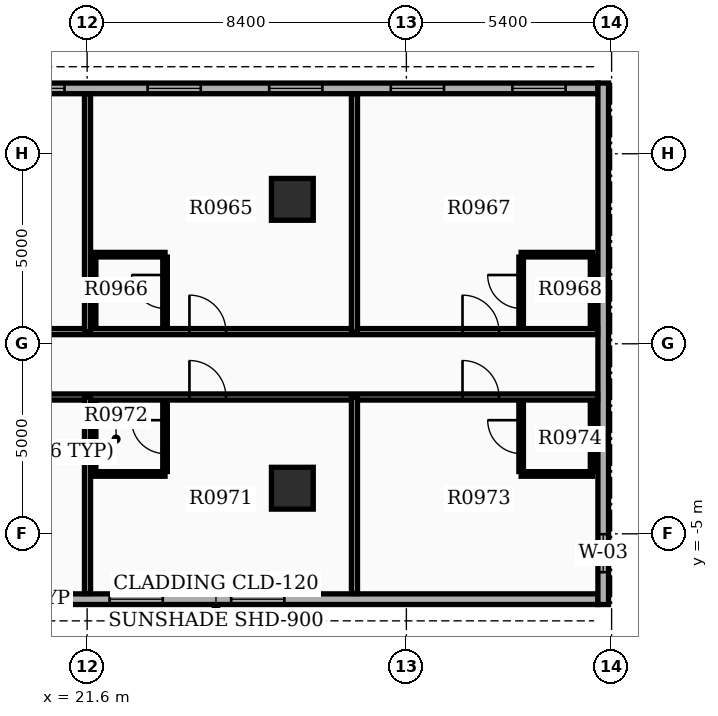
"""IFC4 building model, lengths in metres.
Left out: names, types, materials, properties, quantities, classifications, styles, units other than length and angle.
Written with IfcOpenShell. Run it as: python <this file> out.ifc"""

import sys

from ifc_helpers import new_model, si_unit, direction, frame, frame_2d, origin, origin_2d, place, context, subcontext, project, spatial, rectangle, extrude, element, fill, save


model = new_model("IFC4")
c1 = context("Model", 3, precision=1e-05, world=origin(), true_north=direction((0.0, 1.0)))
c2 = subcontext(c1, "Body", "Model", "MODEL_VIEW")
j1 = project(units=[si_unit("LENGTHUNIT", "METRE"), si_unit("PLANEANGLEUNIT", "RADIAN")], contexts=[c1])
p1 = place(None, origin())
s1 = spatial("IfcSite", under=j1, at=p1, CompositionType="ELEMENT")
p2 = place(p1, origin())
s2 = spatial("IfcBuilding", under=s1, at=p2, CompositionType="ELEMENT")
p3 = place(p2, frame((0.0, 0.0, 63.9)))
s3 = spatial("IfcBuildingStorey", under=s2, at=p3, CompositionType="ELEMENT", Elevation=63.9)
for number, where, z_axis, x_axis in (
    (1, (27.0, -3.8, 0.0), (0.0, 0.0, 1.0), (1.0, 0.0, 0.0)),
    (2, (27.0, 3.8, 0.0), (0.0, 0.0, 1.0), (1.0, 0.0, 0.0)),
):
    element("IfcColumn", number, at=place(p3, frame(where, z_axis=z_axis, x_axis=x_axis)), inside=s3, PredefinedType="COLUMN", context=c2, shape_type="SweptSolid", body=[
        extrude(rectangle(XDim=1.1, YDim=1.1, at=origin_2d()), origin(), (0.0, 0.0, 1.0), 3.9),
    ])
p4 = place(p3, frame((14.94, -6.72, 0.0), z_axis=(0.0, 0.0, 1.0), x_axis=(1.0, 0.0, 0.0)))
e3 = element("IfcWall", 3, at=p4, inside=s3, PredefinedType="STANDARD", context=c2, shape_type="SweptSolid", body=[
    extrude(rectangle(XDim=20.1, YDim=0.28, at=frame_2d((10.05, 0.0))), origin(), (0.0, 0.0, 1.0), 2.91),
])
p5 = place(p4, frame((4.05, 0.0, 0.8)))
e4 = element("IfcOpeningElement", 4, at=p5, cuts=e3, PredefinedType="OPENING", context=c2, shape_type="SweptSolid", body=[
    extrude(rectangle(XDim=1.4, YDim=1.6, at=frame_2d((0.7, 0.8))), frame((0.0, 0.15, 0.0), z_axis=(0.0, -1.0, 0.0), x_axis=(1.0, 0.0, 0.0)), (0.0, 0.0, 1.0), 0.3),
])
p6 = place(p4, frame((7.25, 0.0, 0.8)))
e5 = element("IfcOpeningElement", 5, at=p6, cuts=e3, PredefinedType="OPENING", context=c2, shape_type="SweptSolid", body=[
    extrude(rectangle(XDim=1.4, YDim=1.6, at=frame_2d((0.7, 0.8))), frame((0.0, 0.15, 0.0), z_axis=(0.0, -1.0, 0.0), x_axis=(1.0, 0.0, 0.0)), (0.0, 0.0, 1.0), 0.3),
])
p7 = place(p4, frame((10.45, 0.0, 0.8)))
e6 = element("IfcOpeningElement", 6, at=p7, cuts=e3, PredefinedType="OPENING", context=c2, shape_type="SweptSolid", body=[
    extrude(rectangle(XDim=1.4, YDim=1.6, at=frame_2d((0.7, 0.8))), frame((0.0, 0.15, 0.0), z_axis=(0.0, -1.0, 0.0), x_axis=(1.0, 0.0, 0.0)), (0.0, 0.0, 1.0), 0.3),
])
p8 = place(p4, frame((0.3, 0.0, 0.0)))
e7 = element("IfcOpeningElement", 7, at=p8, cuts=e3, PredefinedType="OPENING", context=c2, shape_type="SweptSolid", body=[
    extrude(rectangle(XDim=0.96, YDim=2.1, at=frame_2d((0.48, 1.05))), frame((0.0, 0.15, 0.0), z_axis=(0.0, -1.0, 0.0), x_axis=(1.0, 0.0, 0.0)), (0.0, 0.0, 1.0), 0.3),
])
p9 = place(p3, frame((35.04, 6.72, 0.0), z_axis=(0.0, 0.0, 1.0), x_axis=(-1.0, 0.0, 0.0)))
e8 = element("IfcWall", 8, at=p9, inside=s3, PredefinedType="STANDARD", context=c2, shape_type="SweptSolid", body=[
    extrude(rectangle(XDim=20.1, YDim=0.28, at=frame_2d((10.05, 0.0))), origin(), (0.0, 0.0, 1.0), 2.91),
])
p10 = place(p9, frame((0.85, 0.0, 0.8)))
e9 = element("IfcOpeningElement", 9, at=p10, cuts=e8, PredefinedType="OPENING", context=c2, shape_type="SweptSolid", body=[
    extrude(rectangle(XDim=1.4, YDim=1.6, at=frame_2d((0.7, 0.8))), frame((0.0, 0.15, 0.0), z_axis=(0.0, -1.0, 0.0), x_axis=(1.0, 0.0, 0.0)), (0.0, 0.0, 1.0), 0.3),
])
p11 = place(p9, frame((4.05, 0.0, 0.8)))
e10 = element("IfcOpeningElement", 10, at=p11, cuts=e8, PredefinedType="OPENING", context=c2, shape_type="SweptSolid", body=[
    extrude(rectangle(XDim=1.4, YDim=1.6, at=frame_2d((0.7, 0.8))), frame((0.0, 0.15, 0.0), z_axis=(0.0, -1.0, 0.0), x_axis=(1.0, 0.0, 0.0)), (0.0, 0.0, 1.0), 0.3),
])
p12 = place(p9, frame((7.25, 0.0, 0.8)))
e11 = element("IfcOpeningElement", 11, at=p12, cuts=e8, PredefinedType="OPENING", context=c2, shape_type="SweptSolid", body=[
    extrude(rectangle(XDim=1.4, YDim=1.6, at=frame_2d((0.7, 0.8))), frame((0.0, 0.15, 0.0), z_axis=(0.0, -1.0, 0.0), x_axis=(1.0, 0.0, 0.0)), (0.0, 0.0, 1.0), 0.3),
])
p13 = place(p9, frame((10.45, 0.0, 0.8)))
e12 = element("IfcOpeningElement", 12, at=p13, cuts=e8, PredefinedType="OPENING", context=c2, shape_type="SweptSolid", body=[
    extrude(rectangle(XDim=1.4, YDim=1.6, at=frame_2d((0.7, 0.8))), frame((0.0, 0.15, 0.0), z_axis=(0.0, -1.0, 0.0), x_axis=(1.0, 0.0, 0.0)), (0.0, 0.0, 1.0), 0.3),
])
p14 = place(p9, frame((14.035, 0.0, 0.85)))
e13 = element("IfcOpeningElement", 13, at=p14, cuts=e8, PredefinedType="OPENING", context=c2, shape_type="SweptSolid", body=[
    extrude(rectangle(XDim=1.2, YDim=1.6, at=frame_2d((0.6, 0.8))), frame((0.0, 0.15, 0.0), z_axis=(0.0, -1.0, 0.0), x_axis=(1.0, 0.0, 0.0)), (0.0, 0.0, 1.0), 0.3),
])
p15 = place(p3, frame((35.18, -6.86, 0.0), z_axis=(0.0, 0.0, 1.0), x_axis=(0.0, 1.0, 0.0)))
e14 = element("IfcWall", 14, at=p15, inside=s3, PredefinedType="STANDARD", context=c2, shape_type="SweptSolid", body=[
    extrude(rectangle(XDim=13.72, YDim=0.28, at=frame_2d((6.86, 0.0))), origin(), (0.0, 0.0, 1.0), 2.91),
])
p16 = place(p15, frame((0.85, 0.0, 0.85)))
e15 = element("IfcOpeningElement", 15, at=p16, cuts=e14, PredefinedType="OPENING", context=c2, shape_type="SweptSolid", body=[
    extrude(rectangle(XDim=1.0, YDim=1.5, at=frame_2d((0.5, 0.75))), frame((0.0, 0.15, 0.0), z_axis=(0.0, -1.0, 0.0), x_axis=(1.0, 0.0, 0.0)), (0.0, 0.0, 1.0), 0.3),
])
p17 = place(p3, frame((14.85, 0.32, 0.0), z_axis=(0.0, 0.0, 1.0), x_axis=(1.0, 0.0, 0.0)))
e16 = element("IfcWall", 16, at=p17, inside=s3, PredefinedType="PARTITIONING", context=c2, shape_type="SweptSolid", body=[
    extrude(rectangle(XDim=20.182, YDim=0.16, at=frame_2d((10.091, 0.0))), origin(), (0.0, 0.0, 1.0), 2.9),
])
p18 = place(p17, frame((2.656, 0.0, 0.0)))
e17 = element("IfcOpeningElement", 17, at=p18, cuts=e16, PredefinedType="OPENING", context=c2, shape_type="SweptSolid", body=[
    extrude(rectangle(XDim=0.96, YDim=2.15, at=frame_2d((0.48, 1.075))), frame((0.0, 0.09, 0.0), z_axis=(0.0, -1.0, 0.0), x_axis=(1.0, 0.0, 0.0)), (0.0, 0.0, 1.0), 0.18),
])
p19 = place(p17, frame((9.442, 0.0, 0.0)))
e18 = element("IfcOpeningElement", 18, at=p19, cuts=e16, PredefinedType="OPENING", context=c2, shape_type="SweptSolid", body=[
    extrude(rectangle(XDim=0.96, YDim=2.15, at=frame_2d((0.48, 1.075))), frame((0.0, 0.09, 0.0), z_axis=(0.0, -1.0, 0.0), x_axis=(1.0, 0.0, 0.0)), (0.0, 0.0, 1.0), 0.18),
])
p20 = place(p17, frame((16.627, 0.0, 0.0)))
e19 = element("IfcOpeningElement", 19, at=p20, cuts=e16, PredefinedType="OPENING", context=c2, shape_type="SweptSolid", body=[
    extrude(rectangle(XDim=0.96, YDim=2.15, at=frame_2d((0.48, 1.075))), frame((0.0, 0.09, 0.0), z_axis=(0.0, -1.0, 0.0), x_axis=(1.0, 0.0, 0.0)), (0.0, 0.0, 1.0), 0.18),
])
for number, where, z_axis, x_axis in (
    (20, (21.61, 0.32, 0.0), (0.0, 0.0, 1.0), (0.0, 1.0, 0.0)),
    (21, (28.634, 0.32, 0.0), (0.0, 0.0, 1.0), (0.0, 1.0, 0.0)),
):
    element("IfcWall", number, at=place(p3, frame(where, z_axis=z_axis, x_axis=x_axis)), inside=s3, PredefinedType="PARTITIONING", context=c2, shape_type="SweptSolid", body=[
        extrude(rectangle(XDim=6.252, YDim=0.16, at=frame_2d((3.126, 0.0))), origin(), (0.0, 0.0, 1.0), 2.9),
    ])
p21 = place(p3, frame((23.65, 0.46, 0.0), z_axis=(0.0, 0.0, 1.0), x_axis=(0.0, 1.0, 0.0)))
e22 = element("IfcWall", 22, at=p21, inside=s3, PredefinedType="PARTITIONING", context=c2, shape_type="SweptSolid", body=[
    extrude(rectangle(XDim=1.82, YDim=0.12, at=frame_2d((0.91, 0.0))), origin(), (0.0, 0.0, 1.0), 2.9),
])
p22 = place(p21, frame((0.47, 0.0, 0.0)))
e23 = element("IfcOpeningElement", 23, at=p22, cuts=e22, PredefinedType="OPENING", context=c2, shape_type="SweptSolid", body=[
    extrude(rectangle(XDim=0.88, YDim=2.1, at=frame_2d((0.44, 1.05))), frame((0.0, 0.07, 0.0), z_axis=(0.0, -1.0, 0.0), x_axis=(1.0, 0.0, 0.0)), (0.0, 0.0, 1.0), 0.14),
])
p23 = place(p3, frame((21.77, 0.46, 0.0), z_axis=(0.0, 0.0, 1.0), x_axis=(0.0, 1.0, 0.0)))
e24 = element("IfcWall", 24, at=p23, inside=s3, PredefinedType="PARTITIONING", context=c2, shape_type="SweptSolid", body=[
    extrude(rectangle(XDim=1.82, YDim=0.12, at=frame_2d((0.91, 0.0))), origin(), (0.0, 0.0, 1.0), 2.9),
])
p24 = place(p3, frame((21.77, 2.345, 0.0), z_axis=(0.0, 0.0, 1.0), x_axis=(1.0, 0.0, 0.0)))
e25 = element("IfcWall", 25, at=p24, inside=s3, PredefinedType="PARTITIONING", context=c2, shape_type="SweptSolid", body=[
    extrude(rectangle(XDim=1.88, YDim=0.12, at=frame_2d((0.94, 0.0))), origin(), (0.0, 0.0, 1.0), 2.9),
])
p25 = place(p3, frame((33.02, 0.46, 0.0), z_axis=(0.0, 0.0, 1.0), x_axis=(0.0, 1.0, 0.0)))
e26 = element("IfcWall", 26, at=p25, inside=s3, PredefinedType="PARTITIONING", context=c2, shape_type="SweptSolid", body=[
    extrude(rectangle(XDim=1.82, YDim=0.12, at=frame_2d((0.91, 0.0))), origin(), (0.0, 0.0, 1.0), 2.9),
])
p26 = place(p25, frame((0.47, 0.0, 0.0)))
e27 = element("IfcOpeningElement", 27, at=p26, cuts=e26, PredefinedType="OPENING", context=c2, shape_type="SweptSolid", body=[
    extrude(rectangle(XDim=0.88, YDim=2.1, at=frame_2d((0.44, 1.05))), frame((0.0, 0.07, 0.0), z_axis=(0.0, -1.0, 0.0), x_axis=(1.0, 0.0, 0.0)), (0.0, 0.0, 1.0), 0.14),
])
p27 = place(p3, frame((34.9, 0.46, 0.0), z_axis=(0.0, 0.0, 1.0), x_axis=(0.0, 1.0, 0.0)))
e28 = element("IfcWall", 28, at=p27, inside=s3, PredefinedType="PARTITIONING", context=c2, shape_type="SweptSolid", body=[
    extrude(rectangle(XDim=1.82, YDim=0.12, at=frame_2d((0.91, 0.0))), origin(), (0.0, 0.0, 1.0), 2.9),
])
p28 = place(p3, frame((33.02, 2.345, 0.0), z_axis=(0.0, 0.0, 1.0), x_axis=(1.0, 0.0, 0.0)))
e29 = element("IfcWall", 29, at=p28, inside=s3, PredefinedType="PARTITIONING", context=c2, shape_type="SweptSolid", body=[
    extrude(rectangle(XDim=1.88, YDim=0.12, at=frame_2d((0.94, 0.0))), origin(), (0.0, 0.0, 1.0), 2.9),
])
p29 = place(p3, frame((14.85, -1.4, 0.0), z_axis=(0.0, 0.0, 1.0), x_axis=(1.0, 0.0, 0.0)))
e30 = element("IfcWall", 30, at=p29, inside=s3, PredefinedType="PARTITIONING", context=c2, shape_type="SweptSolid", body=[
    extrude(rectangle(XDim=20.182, YDim=0.16, at=frame_2d((10.091, 0.0))), origin(), (0.0, 0.0, 1.0), 2.9),
])
p30 = place(p29, frame((2.656, 0.0, 0.0)))
e31 = element("IfcOpeningElement", 31, at=p30, cuts=e30, PredefinedType="OPENING", context=c2, shape_type="SweptSolid", body=[
    extrude(rectangle(XDim=0.96, YDim=2.15, at=frame_2d((0.48, 1.075))), frame((0.0, 0.09, 0.0), z_axis=(0.0, -1.0, 0.0), x_axis=(1.0, 0.0, 0.0)), (0.0, 0.0, 1.0), 0.18),
])
p31 = place(p29, frame((9.442, 0.0, 0.0)))
e32 = element("IfcOpeningElement", 32, at=p31, cuts=e30, PredefinedType="OPENING", context=c2, shape_type="SweptSolid", body=[
    extrude(rectangle(XDim=0.96, YDim=2.15, at=frame_2d((0.48, 1.075))), frame((0.0, 0.09, 0.0), z_axis=(0.0, -1.0, 0.0), x_axis=(1.0, 0.0, 0.0)), (0.0, 0.0, 1.0), 0.18),
])
p32 = place(p29, frame((16.627, 0.0, 0.0)))
e33 = element("IfcOpeningElement", 33, at=p32, cuts=e30, PredefinedType="OPENING", context=c2, shape_type="SweptSolid", body=[
    extrude(rectangle(XDim=0.96, YDim=2.15, at=frame_2d((0.48, 1.075))), frame((0.0, 0.09, 0.0), z_axis=(0.0, -1.0, 0.0), x_axis=(1.0, 0.0, 0.0)), (0.0, 0.0, 1.0), 0.18),
])
for number, where, z_axis, x_axis in (
    (34, (21.61, -1.4, 0.0), (0.0, 0.0, 1.0), (0.0, -1.0, 0.0)),
    (35, (28.634, -1.4, 0.0), (0.0, 0.0, 1.0), (0.0, -1.0, 0.0)),
):
    element("IfcWall", number, at=place(p3, frame(where, z_axis=z_axis, x_axis=x_axis)), inside=s3, PredefinedType="PARTITIONING", context=c2, shape_type="SweptSolid", body=[
        extrude(rectangle(XDim=5.172, YDim=0.16, at=frame_2d((2.586, 0.0))), origin(), (0.0, 0.0, 1.0), 2.9),
    ])
p33 = place(p3, frame((23.65, -3.36, 0.0), z_axis=(0.0, 0.0, 1.0), x_axis=(0.0, 1.0, 0.0)))
e36 = element("IfcWall", 36, at=p33, inside=s3, PredefinedType="PARTITIONING", context=c2, shape_type="SweptSolid", body=[
    extrude(rectangle(XDim=1.82, YDim=0.12, at=frame_2d((0.91, 0.0))), origin(), (0.0, 0.0, 1.0), 2.9),
])
p34 = place(p33, frame((0.47, 0.0, 0.0)))
e37 = element("IfcOpeningElement", 37, at=p34, cuts=e36, PredefinedType="OPENING", context=c2, shape_type="SweptSolid", body=[
    extrude(rectangle(XDim=0.88, YDim=2.1, at=frame_2d((0.44, 1.05))), frame((0.0, 0.07, 0.0), z_axis=(0.0, -1.0, 0.0), x_axis=(1.0, 0.0, 0.0)), (0.0, 0.0, 1.0), 0.14),
])
p35 = place(p3, frame((21.77, -3.36, 0.0), z_axis=(0.0, 0.0, 1.0), x_axis=(0.0, 1.0, 0.0)))
e38 = element("IfcWall", 38, at=p35, inside=s3, PredefinedType="PARTITIONING", context=c2, shape_type="SweptSolid", body=[
    extrude(rectangle(XDim=1.82, YDim=0.12, at=frame_2d((0.91, 0.0))), origin(), (0.0, 0.0, 1.0), 2.9),
])
p36 = place(p3, frame((21.77, -3.425, 0.0), z_axis=(0.0, 0.0, 1.0), x_axis=(1.0, 0.0, 0.0)))
e39 = element("IfcWall", 39, at=p36, inside=s3, PredefinedType="PARTITIONING", context=c2, shape_type="SweptSolid", body=[
    extrude(rectangle(XDim=1.88, YDim=0.12, at=frame_2d((0.94, 0.0))), origin(), (0.0, 0.0, 1.0), 2.9),
])
p37 = place(p3, frame((33.02, -3.36, 0.0), z_axis=(0.0, 0.0, 1.0), x_axis=(0.0, 1.0, 0.0)))
e40 = element("IfcWall", 40, at=p37, inside=s3, PredefinedType="PARTITIONING", context=c2, shape_type="SweptSolid", body=[
    extrude(rectangle(XDim=1.82, YDim=0.12, at=frame_2d((0.91, 0.0))), origin(), (0.0, 0.0, 1.0), 2.9),
])
p38 = place(p37, frame((0.47, 0.0, 0.0)))
e41 = element("IfcOpeningElement", 41, at=p38, cuts=e40, PredefinedType="OPENING", context=c2, shape_type="SweptSolid", body=[
    extrude(rectangle(XDim=0.88, YDim=2.1, at=frame_2d((0.44, 1.05))), frame((0.0, 0.07, 0.0), z_axis=(0.0, -1.0, 0.0), x_axis=(1.0, 0.0, 0.0)), (0.0, 0.0, 1.0), 0.14),
])
p39 = place(p3, frame((34.9, -3.36, 0.0), z_axis=(0.0, 0.0, 1.0), x_axis=(0.0, 1.0, 0.0)))
e42 = element("IfcWall", 42, at=p39, inside=s3, PredefinedType="PARTITIONING", context=c2, shape_type="SweptSolid", body=[
    extrude(rectangle(XDim=1.82, YDim=0.12, at=frame_2d((0.91, 0.0))), origin(), (0.0, 0.0, 1.0), 2.9),
])
p40 = place(p3, frame((33.02, -3.425, 0.0), z_axis=(0.0, 0.0, 1.0), x_axis=(1.0, 0.0, 0.0)))
e43 = element("IfcWall", 43, at=p40, inside=s3, PredefinedType="PARTITIONING", context=c2, shape_type="SweptSolid", body=[
    extrude(rectangle(XDim=1.88, YDim=0.12, at=frame_2d((0.94, 0.0))), origin(), (0.0, 0.0, 1.0), 2.9),
])
p41 = place(p6, origin())
e44 = element("IfcWindow", 44, at=p41, inside=s3, PartitioningType="SINGLE_PANEL", PredefinedType="WINDOW", context=c2, shape_type="SweptSolid", body=[
    extrude(rectangle(XDim=1.4, YDim=1.6, at=frame_2d((0.7, 0.8))), frame((0.0, 0.03, 0.0), z_axis=(0.0, -1.0, 0.0), x_axis=(1.0, 0.0, 0.0)), (0.0, 0.0, 1.0), 0.06),
])
fill(e5, e44)
p42 = place(p7, origin())
e45 = element("IfcWindow", 45, at=p42, inside=s3, PartitioningType="SINGLE_PANEL", PredefinedType="WINDOW", context=c2, shape_type="SweptSolid", body=[
    extrude(rectangle(XDim=1.4, YDim=1.6, at=frame_2d((0.7, 0.8))), frame((0.0, 0.03, 0.0), z_axis=(0.0, -1.0, 0.0), x_axis=(1.0, 0.0, 0.0)), (0.0, 0.0, 1.0), 0.06),
])
fill(e6, e45)
p43 = place(p10, origin())
e46 = element("IfcWindow", 46, at=p43, inside=s3, PartitioningType="SINGLE_PANEL", PredefinedType="WINDOW", context=c2, shape_type="SweptSolid", body=[
    extrude(rectangle(XDim=1.4, YDim=1.6, at=frame_2d((0.7, 0.8))), frame((0.0, 0.03, 0.0), z_axis=(0.0, -1.0, 0.0), x_axis=(1.0, 0.0, 0.0)), (0.0, 0.0, 1.0), 0.06),
])
fill(e9, e46)
p44 = place(p11, origin())
e47 = element("IfcWindow", 47, at=p44, inside=s3, PartitioningType="SINGLE_PANEL", PredefinedType="WINDOW", context=c2, shape_type="SweptSolid", body=[
    extrude(rectangle(XDim=1.4, YDim=1.6, at=frame_2d((0.7, 0.8))), frame((0.0, 0.03, 0.0), z_axis=(0.0, -1.0, 0.0), x_axis=(1.0, 0.0, 0.0)), (0.0, 0.0, 1.0), 0.06),
])
fill(e10, e47)
p45 = place(p12, origin())
e48 = element("IfcWindow", 48, at=p45, inside=s3, PartitioningType="SINGLE_PANEL", PredefinedType="WINDOW", context=c2, shape_type="SweptSolid", body=[
    extrude(rectangle(XDim=1.4, YDim=1.6, at=frame_2d((0.7, 0.8))), frame((0.0, 0.03, 0.0), z_axis=(0.0, -1.0, 0.0), x_axis=(1.0, 0.0, 0.0)), (0.0, 0.0, 1.0), 0.06),
])
fill(e11, e48)
p46 = place(p13, origin())
e49 = element("IfcWindow", 49, at=p46, inside=s3, PartitioningType="SINGLE_PANEL", PredefinedType="WINDOW", context=c2, shape_type="SweptSolid", body=[
    extrude(rectangle(XDim=1.4, YDim=1.6, at=frame_2d((0.7, 0.8))), frame((0.0, 0.03, 0.0), z_axis=(0.0, -1.0, 0.0), x_axis=(1.0, 0.0, 0.0)), (0.0, 0.0, 1.0), 0.06),
])
fill(e12, e49)
p47 = place(p16, origin())
e50 = element("IfcWindow", 50, at=p47, inside=s3, PartitioningType="SINGLE_PANEL", PredefinedType="WINDOW", context=c2, shape_type="SweptSolid", body=[
    extrude(rectangle(XDim=1.0, YDim=1.5, at=frame_2d((0.5, 0.75))), frame((0.0, 0.03, 0.0), z_axis=(0.0, -1.0, 0.0), x_axis=(1.0, 0.0, 0.0)), (0.0, 0.0, 1.0), 0.06),
])
fill(e15, e50)
p48 = place(p14, origin())
e51 = element("IfcWindow", 51, at=p48, inside=s3, PartitioningType="SINGLE_PANEL", PredefinedType="WINDOW", context=c2, shape_type="SweptSolid", body=[
    extrude(rectangle(XDim=1.2, YDim=1.6, at=frame_2d((0.6, 0.8))), frame((0.0, 0.03, 0.0), z_axis=(0.0, -1.0, 0.0), x_axis=(1.0, 0.0, 0.0)), (0.0, 0.0, 1.0), 0.06),
])
fill(e13, e51)
p49 = place(p19, origin())
e52 = element("IfcDoor", 52, at=p49, inside=s3, OperationType="SINGLE_SWING_LEFT", PredefinedType="DOOR", context=c2, shape_type="SweptSolid", body=[
    extrude(rectangle(XDim=0.96, YDim=2.15, at=frame_2d((0.48, 1.075))), frame((0.0, 0.025, 0.0), z_axis=(0.0, -1.0, 0.0), x_axis=(1.0, 0.0, 0.0)), (0.0, 0.0, 1.0), 0.05),
])
fill(e18, e52)
p50 = place(p22, origin())
e53 = element("IfcDoor", 53, at=p50, inside=s3, OperationType="SINGLE_SWING_RIGHT", PredefinedType="DOOR", context=c2, shape_type="SweptSolid", body=[
    extrude(rectangle(XDim=0.88, YDim=2.1, at=frame_2d((0.44, 1.05))), frame((0.0, 0.025, 0.0), z_axis=(0.0, -1.0, 0.0), x_axis=(1.0, 0.0, 0.0)), (0.0, 0.0, 1.0), 0.05),
])
fill(e23, e53)
p51 = place(p20, origin())
e54 = element("IfcDoor", 54, at=p51, inside=s3, OperationType="SINGLE_SWING_LEFT", PredefinedType="DOOR", context=c2, shape_type="SweptSolid", body=[
    extrude(rectangle(XDim=0.96, YDim=2.15, at=frame_2d((0.48, 1.075))), frame((0.0, 0.025, 0.0), z_axis=(0.0, -1.0, 0.0), x_axis=(1.0, 0.0, 0.0)), (0.0, 0.0, 1.0), 0.05),
])
fill(e19, e54)
p52 = place(p26, origin())
e55 = element("IfcDoor", 55, at=p52, inside=s3, OperationType="SINGLE_SWING_RIGHT", PredefinedType="DOOR", context=c2, shape_type="SweptSolid", body=[
    extrude(rectangle(XDim=0.88, YDim=2.1, at=frame_2d((0.44, 1.05))), frame((0.0, 0.025, 0.0), z_axis=(0.0, -1.0, 0.0), x_axis=(1.0, 0.0, 0.0)), (0.0, 0.0, 1.0), 0.05),
])
fill(e27, e55)
p53 = place(p31, origin())
e56 = element("IfcDoor", 56, at=p53, inside=s3, OperationType="SINGLE_SWING_LEFT", PredefinedType="DOOR", context=c2, shape_type="SweptSolid", body=[
    extrude(rectangle(XDim=0.96, YDim=2.15, at=frame_2d((0.48, 1.075))), frame((0.0, 0.025, 0.0), z_axis=(0.0, -1.0, 0.0), x_axis=(1.0, 0.0, 0.0)), (0.0, 0.0, 1.0), 0.05),
])
fill(e32, e56)
p54 = place(p34, origin())
e57 = element("IfcDoor", 57, at=p54, inside=s3, OperationType="SINGLE_SWING_RIGHT", PredefinedType="DOOR", context=c2, shape_type="SweptSolid", body=[
    extrude(rectangle(XDim=0.88, YDim=2.1, at=frame_2d((0.44, 1.05))), frame((0.0, 0.025, 0.0), z_axis=(0.0, -1.0, 0.0), x_axis=(1.0, 0.0, 0.0)), (0.0, 0.0, 1.0), 0.05),
])
fill(e37, e57)
p55 = place(p32, origin())
e58 = element("IfcDoor", 58, at=p55, inside=s3, OperationType="SINGLE_SWING_LEFT", PredefinedType="DOOR", context=c2, shape_type="SweptSolid", body=[
    extrude(rectangle(XDim=0.96, YDim=2.15, at=frame_2d((0.48, 1.075))), frame((0.0, 0.025, 0.0), z_axis=(0.0, -1.0, 0.0), x_axis=(1.0, 0.0, 0.0)), (0.0, 0.0, 1.0), 0.05),
])
fill(e33, e58)
p56 = place(p38, origin())
e59 = element("IfcDoor", 59, at=p56, inside=s3, OperationType="SINGLE_SWING_RIGHT", PredefinedType="DOOR", context=c2, shape_type="SweptSolid", body=[
    extrude(rectangle(XDim=0.88, YDim=2.1, at=frame_2d((0.44, 1.05))), frame((0.0, 0.025, 0.0), z_axis=(0.0, -1.0, 0.0), x_axis=(1.0, 0.0, 0.0)), (0.0, 0.0, 1.0), 0.05),
])
fill(e41, e59)
save(model, sys.argv[1])
